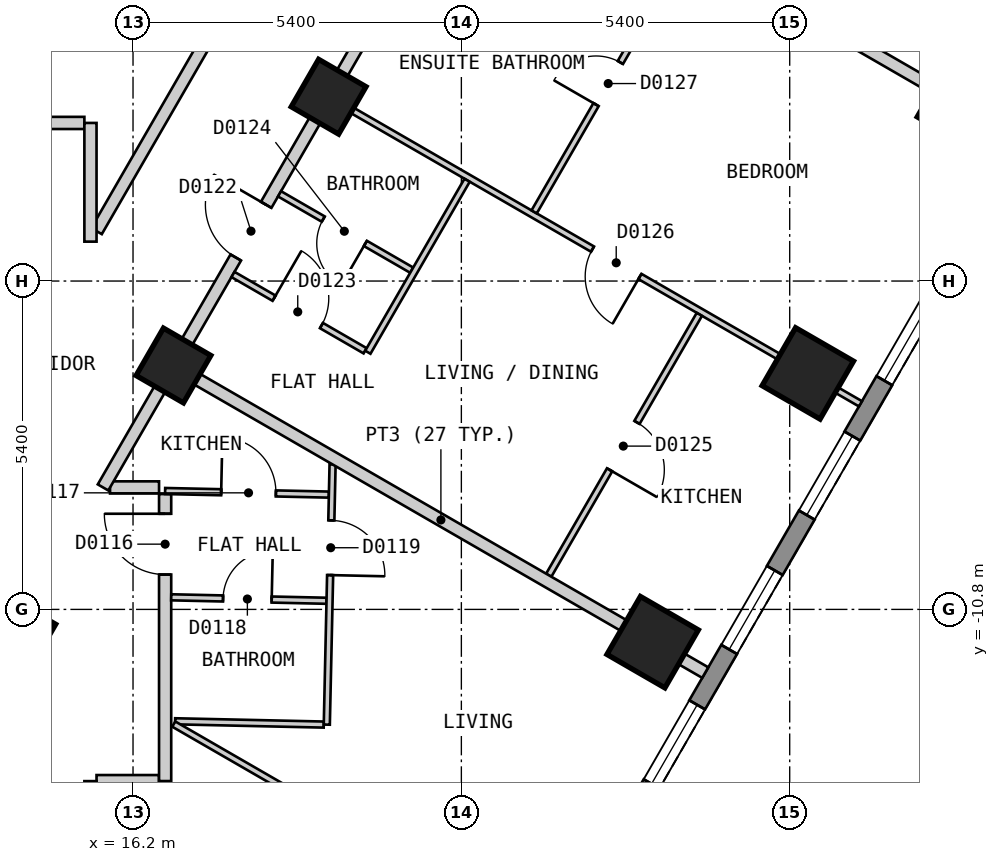
"""IFC4 building model, lengths in metres.
Left out: names, types, materials, properties, quantities, classifications, styles, units other than length and angle.
Written with IfcOpenShell. Run it as: python <this file> out.ifc"""

import sys

from ifc_helpers import new_model, si_unit, direction, frame, frame_2d, origin, origin_2d, place, context, subcontext, project, spatial, polyline, rectangle, outline, extrude, element, fill, save


model = new_model("IFC4")
c1 = context("Model", 3, precision=1e-05, world=origin(), true_north=direction((0.0, 1.0)))
c2 = subcontext(c1, "Body", "Model", "MODEL_VIEW")
j1 = project(units=[si_unit("LENGTHUNIT", "METRE"), si_unit("PLANEANGLEUNIT", "RADIAN")], contexts=[c1])
p1 = place(None, origin())
s1 = spatial("IfcSite", under=j1, at=p1, CompositionType="ELEMENT")
p2 = place(p1, origin())
s2 = spatial("IfcBuilding", under=s1, at=p2, CompositionType="ELEMENT")
p3 = place(p2, frame((0.0, 0.0, 29.4)))
s3 = spatial("IfcBuildingStorey", under=s2, at=p3, CompositionType="ELEMENT", Elevation=29.4)
for number, where, z_axis, x_axis in (
    (1, (24.746, -11.339, 0.0), (0.0, 0.0, 1.0), (0.5, 0.866, 0.0)),
    (2, (27.298, -6.919, 0.0), (0.0, 0.0, 1.0), (0.5, 0.866, 0.0)),
    (3, (29.849, -2.499, 0.0), (0.0, 0.0, 1.0), (0.5, 0.866, 0.0)),
):
    element("IfcColumn", number, at=place(p3, frame(where, z_axis=z_axis, x_axis=x_axis)), inside=s3, PredefinedType="COLUMN", context=c2, shape_type="SweptSolid", body=[
        extrude(rectangle(XDim=1.1, YDim=1.1, at=origin_2d()), origin(), (0.0, 0.0, 1.0), 3.0),
    ])
for number, where, z_axis, x_axis in (
    (4, (14.313, -11.209, 0.0), (0.0, 0.0, 1.0), (0.5, 0.866, 0.0)),
    (5, (16.865, -6.789, 0.0), (0.0, 0.0, 1.0), (0.5, 0.866, 0.0)),
    (6, (19.417, -2.369, 0.0), (0.0, 0.0, 1.0), (0.5, 0.866, 0.0)),
):
    element("IfcColumn", number, at=place(p3, frame(where, z_axis=z_axis, x_axis=x_axis)), inside=s3, PredefinedType="COLUMN", context=c2, shape_type="SweptSolid", body=[
        extrude(rectangle(XDim=0.9, YDim=0.9, at=origin_2d()), origin(), (0.0, 0.0, 1.0), 3.0),
    ])
p4 = place(p3, frame((17.71, -25.825, 0.0), z_axis=(0.0, 0.0, 1.0), x_axis=(0.500001938803, 0.866024284413, 0.0)))
e7 = element("IfcWall", 7, at=p4, inside=s3, PredefinedType="SOLIDWALL", context=c2, shape_type="SweptSolid", body=[
    extrude(outline(polyline([(0.0, -0.15), (27.02, -0.15), (26.94, 0.15), (0.08, 0.15), (0.0, -0.15)])), origin(), (0.0, 0.0, 1.0), 2.7),
])
p5 = place(p4, frame((1.277, 0.0, 0.15)))
e8 = element("IfcOpeningElement", 8, at=p5, cuts=e7, PredefinedType="OPENING", context=c2, shape_type="SweptSolid", body=[
    extrude(rectangle(XDim=1.5, YDim=2.1, at=frame_2d((0.75, 1.05))), frame((0.0, 0.16, 0.0), z_axis=(0.0, -1.0, 0.0), x_axis=(1.0, 0.0, 0.0)), (0.0, 0.0, 1.0), 0.32),
])
p6 = place(p4, frame((3.829, 0.0, 0.15)))
e9 = element("IfcOpeningElement", 9, at=p6, cuts=e7, PredefinedType="OPENING", context=c2, shape_type="SweptSolid", body=[
    extrude(rectangle(XDim=1.5, YDim=2.1, at=frame_2d((0.75, 1.05))), frame((0.0, 0.16, 0.0), z_axis=(0.0, -1.0, 0.0), x_axis=(1.0, 0.0, 0.0)), (0.0, 0.0, 1.0), 0.32),
])
p7 = place(p4, frame((6.382, 0.0, 0.15)))
e10 = element("IfcOpeningElement", 10, at=p7, cuts=e7, PredefinedType="OPENING", context=c2, shape_type="SweptSolid", body=[
    extrude(rectangle(XDim=1.5, YDim=2.1, at=frame_2d((0.75, 1.05))), frame((0.0, 0.16, 0.0), z_axis=(0.0, -1.0, 0.0), x_axis=(1.0, 0.0, 0.0)), (0.0, 0.0, 1.0), 0.32),
])
p8 = place(p4, frame((8.933, 0.0, 0.15)))
e11 = element("IfcOpeningElement", 11, at=p8, cuts=e7, PredefinedType="OPENING", context=c2, shape_type="SweptSolid", body=[
    extrude(rectangle(XDim=1.5, YDim=2.1, at=frame_2d((0.75, 1.05))), frame((0.0, 0.16, 0.0), z_axis=(0.0, -1.0, 0.0), x_axis=(1.0, 0.0, 0.0)), (0.0, 0.0, 1.0), 0.32),
])
p9 = place(p4, frame((11.485, 0.0, 0.15)))
e12 = element("IfcOpeningElement", 12, at=p9, cuts=e7, PredefinedType="OPENING", context=c2, shape_type="SweptSolid", body=[
    extrude(rectangle(XDim=1.5, YDim=2.1, at=frame_2d((0.75, 1.05))), frame((0.0, 0.16, 0.0), z_axis=(0.0, -1.0, 0.0), x_axis=(1.0, 0.0, 0.0)), (0.0, 0.0, 1.0), 0.32),
])
p10 = place(p4, frame((14.037, 0.0, 0.15)))
e13 = element("IfcOpeningElement", 13, at=p10, cuts=e7, PredefinedType="OPENING", context=c2, shape_type="SweptSolid", body=[
    extrude(rectangle(XDim=1.5, YDim=2.1, at=frame_2d((0.75, 1.05))), frame((0.0, 0.16, 0.0), z_axis=(0.0, -1.0, 0.0), x_axis=(1.0, 0.0, 0.0)), (0.0, 0.0, 1.0), 0.32),
])
p11 = place(p4, frame((16.589, 0.0, 0.15)))
e14 = element("IfcOpeningElement", 14, at=p11, cuts=e7, PredefinedType="OPENING", context=c2, shape_type="SweptSolid", body=[
    extrude(rectangle(XDim=1.5, YDim=2.1, at=frame_2d((0.75, 1.05))), frame((0.0, 0.16, 0.0), z_axis=(0.0, -1.0, 0.0), x_axis=(1.0, 0.0, 0.0)), (0.0, 0.0, 1.0), 0.32),
])
p12 = place(p4, frame((19.141, 0.0, 0.15)))
e15 = element("IfcOpeningElement", 15, at=p12, cuts=e7, PredefinedType="OPENING", context=c2, shape_type="SweptSolid", body=[
    extrude(rectangle(XDim=1.5, YDim=2.1, at=frame_2d((0.75, 1.05))), frame((0.0, 0.16, 0.0), z_axis=(0.0, -1.0, 0.0), x_axis=(1.0, 0.0, 0.0)), (0.0, 0.0, 1.0), 0.32),
])
p13 = place(p4, frame((21.693, 0.0, 0.15)))
e16 = element("IfcOpeningElement", 16, at=p13, cuts=e7, PredefinedType="OPENING", context=c2, shape_type="SweptSolid", body=[
    extrude(rectangle(XDim=1.5, YDim=2.1, at=frame_2d((0.75, 1.05))), frame((0.0, 0.16, 0.0), z_axis=(0.0, -1.0, 0.0), x_axis=(1.0, 0.0, 0.0)), (0.0, 0.0, 1.0), 0.32),
])
p14 = place(p4, frame((24.244, 0.0, 0.15)))
e17 = element("IfcOpeningElement", 17, at=p14, cuts=e7, PredefinedType="OPENING", context=c2, shape_type="SweptSolid", body=[
    extrude(rectangle(XDim=1.5, YDim=2.1, at=frame_2d((0.75, 1.05))), frame((0.0, 0.16, 0.0), z_axis=(0.0, -1.0, 0.0), x_axis=(1.0, 0.0, 0.0)), (0.0, 0.0, 1.0), 0.32),
])
p15 = place(p3, frame((15.822, -8.794, 0.0), z_axis=(0.0, 0.0, 1.0), x_axis=(1.0, 0.0, 0.0)))
e18 = element("IfcWall", 18, at=p15, inside=s3, PredefinedType="PARTITIONING", context=c2, shape_type="SweptSolid", body=[
    extrude(rectangle(XDim=0.806, YDim=0.2, at=frame_2d((0.403, 0.0))), origin(), (0.0, 0.0, 1.0), 2.7),
])
p16 = place(p3, frame((15.6, -13.624, 0.0), z_axis=(0.0, 0.0, 1.0), x_axis=(1.0, 0.0, 0.0)))
e19 = element("IfcWall", 19, at=p16, inside=s3, PredefinedType="PARTITIONING", context=c2, shape_type="SweptSolid", body=[
    extrude(rectangle(XDim=1.027, YDim=0.2, at=frame_2d((0.513, 0.0))), origin(), (0.0, 0.0, 1.0), 2.7),
])
p17 = place(p3, frame((7.028, -2.8, 0.0), z_axis=(0.0, 0.0, 1.0), x_axis=(1.0, 0.0, 0.0)))
e20 = element("IfcWall", 20, at=p17, inside=s3, PredefinedType="PARTITIONING", context=c2, shape_type="SweptSolid", body=[
    extrude(rectangle(XDim=8.372, YDim=0.2, at=frame_2d((4.186, 0.0))), origin(), (0.0, 0.0, 1.0), 2.7),
])
p18 = place(p3, frame((15.6, -4.579, 0.0), z_axis=(0.0, 0.0, 1.0), x_axis=(0.499927597274, 0.866067201483, 0.0)))
e21 = element("IfcWall", 21, at=p18, inside=s3, PredefinedType="PARTITIONING", context=c2, shape_type="SweptSolid", body=[
    extrude(rectangle(XDim=5.288, YDim=0.2, at=frame_2d((2.644, 0.0))), origin(), (0.0, 0.0, 1.0), 2.7),
])
p19 = place(p3, frame((15.707, -8.794, 0.0), z_axis=(0.0, 0.0, 1.0), x_axis=(0.500040469623, 0.866002037376, 0.0)))
e22 = element("IfcWall", 22, at=p19, inside=s3, PredefinedType="PARTITIONING", context=c2, shape_type="SweptSolid", body=[
    extrude(rectangle(XDim=2.281, YDim=0.2, at=frame_2d((1.141, 0.0))), origin(), (0.0, 0.0, 1.0), 2.7),
])
p20 = place(p3, frame((16.914, -6.703, 0.0), z_axis=(0.0, 0.0, 1.0), x_axis=(0.50003007663, 0.866008038338, 0.0)))
e23 = element("IfcWall", 23, at=p20, inside=s3, PredefinedType="PARTITIONING", context=c2, shape_type="SweptSolid", body=[
    extrude(rectangle(XDim=7.625, YDim=0.2, at=frame_2d((3.813, 0.0))), origin(), (0.0, 0.0, 1.0), 2.7),
])
p21 = place(p20, frame((1.952, 0.0, 0.0)))
e24 = element("IfcOpeningElement", 24, at=p21, cuts=e23, PredefinedType="OPENING", context=c2, shape_type="SweptSolid", body=[
    extrude(rectangle(XDim=1.0, YDim=2.1, at=frame_2d((0.5, 1.05))), frame((0.0, 0.11, 0.0), z_axis=(0.0, -1.0, 0.0), x_axis=(1.0, 0.0, 0.0)), (0.0, 0.0, 1.0), 0.22),
])
p22 = place(p3, frame((15.5, -21.199, 0.0), z_axis=(0.0, 0.0, 1.0), x_axis=(0.0, 1.0, 0.0)))
e25 = element("IfcWall", 25, at=p22, inside=s3, PredefinedType="PARTITIONING", context=c2, shape_type="SweptSolid", body=[
    extrude(rectangle(XDim=7.575, YDim=0.2, at=frame_2d((3.788, 0.0))), origin(), (0.0, 0.0, 1.0), 2.7),
])
p23 = place(p22, frame((1.288, 0.0, 0.0)))
e26 = element("IfcOpeningElement", 26, at=p23, cuts=e25, PredefinedType="OPENING", context=c2, shape_type="SweptSolid", body=[
    extrude(rectangle(XDim=0.8, YDim=2.1, at=frame_2d((0.4, 1.05))), frame((0.0, 0.11, 0.0), z_axis=(0.0, -1.0, 0.0), x_axis=(1.0, 0.0, 0.0)), (0.0, 0.0, 1.0), 0.22),
])
p24 = place(p3, frame((15.5, -4.752, 0.0), z_axis=(0.0, 0.0, 1.0), x_axis=(0.0, 1.0, 0.0)))
e27 = element("IfcWall", 27, at=p24, inside=s3, PredefinedType="PARTITIONING", context=c2, shape_type="SweptSolid", body=[
    extrude(rectangle(XDim=1.952, YDim=0.2, at=frame_2d((0.976, 0.0))), origin(), (0.0, 0.0, 1.0), 2.7),
])
p25 = place(p3, frame((16.728, -13.623, 0.0), z_axis=(0.0, 0.0, 1.0), x_axis=(0.0, 1.0, 0.0)))
e28 = element("IfcWall", 28, at=p25, inside=s3, PredefinedType="PARTITIONING", context=c2, shape_type="SweptSolid", body=[
    extrude(rectangle(XDim=4.72, YDim=0.2, at=frame_2d((2.36, 0.0))), origin(), (0.0, 0.0, 1.0), 2.7),
])
p26 = place(p25, frame((3.396, 0.0, 0.0)))
e29 = element("IfcOpeningElement", 29, at=p26, cuts=e28, PredefinedType="OPENING", context=c2, shape_type="SweptSolid", body=[
    extrude(rectangle(XDim=1.0, YDim=2.1, at=frame_2d((0.5, 1.05))), frame((0.0, 0.11, 0.0), z_axis=(0.0, -1.0, 0.0), x_axis=(1.0, 0.0, 0.0)), (0.0, 0.0, 1.0), 0.22),
])
p27 = place(p3, frame((16.728, -8.853, 0.0), z_axis=(0.0, 0.0, 1.0), x_axis=(0.999759401479, -0.02193488442, 0.0)))
e30 = element("IfcWall", 30, at=p27, inside=s3, PredefinedType="PARTITIONING", context=c2, shape_type="SweptSolid", body=[
    extrude(rectangle(XDim=2.694, YDim=0.1, at=frame_2d((1.347, 0.0))), origin(), (0.0, 0.0, 1.0), 2.7),
])
p28 = place(p27, frame((0.922, 0.0, 0.0)))
e31 = element("IfcOpeningElement", 31, at=p28, cuts=e30, PredefinedType="OPENING", context=c2, shape_type="SweptSolid", body=[
    extrude(rectangle(XDim=0.9, YDim=2.1, at=frame_2d((0.45, 1.05))), frame((0.0, 0.06, 0.0), z_axis=(0.0, -1.0, 0.0), x_axis=(1.0, 0.0, 0.0)), (0.0, 0.0, 1.0), 0.12),
])
p29 = place(p3, frame((16.828, -10.601, 0.0), z_axis=(0.0, 0.0, 1.0), x_axis=(0.999752091799, -0.022265555094, 0.0)))
e32 = element("IfcWall", 32, at=p29, inside=s3, PredefinedType="PARTITIONING", context=c2, shape_type="SweptSolid", body=[
    extrude(rectangle(XDim=2.555, YDim=0.1, at=frame_2d((1.277, 0.0))), origin(), (0.0, 0.0, 1.0), 2.7),
])
p30 = place(p29, frame((0.853, 0.0, 0.0)))
e33 = element("IfcOpeningElement", 33, at=p30, cuts=e32, PredefinedType="OPENING", context=c2, shape_type="SweptSolid", body=[
    extrude(rectangle(XDim=0.8, YDim=2.1, at=frame_2d((0.4, 1.05))), frame((0.0, 0.06, 0.0), z_axis=(0.0, -1.0, 0.0), x_axis=(1.0, 0.0, 0.0)), (0.0, 0.0, 1.0), 0.12),
])
p31 = place(p3, frame((16.892, -12.64, 0.0), z_axis=(0.0, 0.0, 1.0), x_axis=(0.999754359069, -0.022163517846, 0.0)))
e34 = element("IfcWall", 34, at=p31, inside=s3, PredefinedType="PARTITIONING", context=c2, shape_type="SweptSolid", body=[
    extrude(rectangle(XDim=2.445, YDim=0.1, at=frame_2d((1.223, 0.0))), origin(), (0.0, 0.0, 1.0), 2.7),
])
p32 = place(p3, frame((16.87, -12.686, 0.0), z_axis=(0.0, 0.0, 1.0), x_axis=(0.866071826058, -0.499919585642, 0.0)))
e35 = element("IfcWall", 35, at=p32, inside=s3, PredefinedType="PARTITIONING", context=c2, shape_type="SweptSolid", body=[
    extrude(rectangle(XDim=7.147, YDim=0.1, at=frame_2d((3.574, 0.0))), origin(), (0.0, 0.0, 1.0), 2.7),
])
p33 = place(p32, frame((4.558, 0.0, 0.0)))
e36 = element("IfcOpeningElement", 36, at=p33, cuts=e35, PredefinedType="OPENING", context=c2, shape_type="SweptSolid", body=[
    extrude(rectangle(XDim=0.9, YDim=2.1, at=frame_2d((0.45, 1.05))), frame((0.0, 0.06, 0.0), z_axis=(0.0, -1.0, 0.0), x_axis=(1.0, 0.0, 0.0)), (0.0, 0.0, 1.0), 0.12),
])
p34 = place(p3, frame((17.844, -5.292, 0.0), z_axis=(0.0, 0.0, 1.0), x_axis=(0.865940918122, -0.500146304917, 0.0)))
e37 = element("IfcWall", 37, at=p34, inside=s3, PredefinedType="PARTITIONING", context=c2, shape_type="SweptSolid", body=[
    extrude(rectangle(XDim=2.51, YDim=0.1, at=frame_2d((1.255, 0.0))), origin(), (0.0, 0.0, 1.0), 2.7),
])
p35 = place(p34, frame((0.78, 0.0, 0.0)))
e38 = element("IfcOpeningElement", 38, at=p35, cuts=e37, PredefinedType="OPENING", context=c2, shape_type="SweptSolid", body=[
    extrude(rectangle(XDim=0.9, YDim=2.1, at=frame_2d((0.45, 1.05))), frame((0.0, 0.06, 0.0), z_axis=(0.0, -1.0, 0.0), x_axis=(1.0, 0.0, 0.0)), (0.0, 0.0, 1.0), 0.12),
])
p36 = place(p3, frame((18.61, -3.966, 0.0), z_axis=(0.0, 0.0, 1.0), x_axis=(0.865958718457, -0.500115484592, 0.0)))
e39 = element("IfcWall", 39, at=p36, inside=s3, PredefinedType="PARTITIONING", context=c2, shape_type="SweptSolid", body=[
    extrude(rectangle(XDim=2.509, YDim=0.1, at=frame_2d((1.255, 0.0))), origin(), (0.0, 0.0, 1.0), 2.7),
])
p37 = place(p36, frame((0.83, 0.0, 0.0)))
e40 = element("IfcOpeningElement", 40, at=p37, cuts=e39, PredefinedType="OPENING", context=c2, shape_type="SweptSolid", body=[
    extrude(rectangle(XDim=0.8, YDim=2.1, at=frame_2d((0.4, 1.05))), frame((0.0, 0.06, 0.0), z_axis=(0.0, -1.0, 0.0), x_axis=(1.0, 0.0, 0.0)), (0.0, 0.0, 1.0), 0.12),
])
p38 = place(p3, frame((19.503, -2.419, 0.0), z_axis=(0.0, 0.0, 1.0), x_axis=(0.866047370643, -0.499961950354, 0.0)))
e41 = element("IfcWall", 41, at=p38, inside=s3, PredefinedType="PARTITIONING", context=c2, shape_type="SweptSolid", body=[
    extrude(rectangle(XDim=10.001, YDim=0.1, at=frame_2d((5.0, 0.0))), origin(), (0.0, 0.0, 1.0), 2.7),
])
p39 = place(p38, frame((4.912, 0.0, 0.0)))
e42 = element("IfcOpeningElement", 42, at=p39, cuts=e41, PredefinedType="OPENING", context=c2, shape_type="SweptSolid", body=[
    extrude(rectangle(XDim=0.9, YDim=2.1, at=frame_2d((0.45, 1.05))), frame((0.0, 0.06, 0.0), z_axis=(0.0, -1.0, 0.0), x_axis=(1.0, 0.0, 0.0)), (0.0, 0.0, 1.0), 0.12),
])
p40 = place(p3, frame((20.062, -6.571, 0.0), z_axis=(0.0, 0.0, 1.0), x_axis=(0.49983032932, 0.866123341039, 0.0)))
e43 = element("IfcWall", 43, at=p40, inside=s3, PredefinedType="PARTITIONING", context=c2, shape_type="SweptSolid", body=[
    extrude(rectangle(XDim=3.265, YDim=0.1, at=frame_2d((1.633, 0.0))), origin(), (0.0, 0.0, 1.0), 2.7),
])
p41 = place(p3, frame((22.797, -4.263, 0.0), z_axis=(0.0, 0.0, 1.0), x_axis=(0.499820637322, 0.866128934112, 0.0)))
e44 = element("IfcWall", 44, at=p41, inside=s3, PredefinedType="PARTITIONING", context=c2, shape_type="SweptSolid", body=[
    extrude(rectangle(XDim=4.807, YDim=0.1, at=frame_2d((2.404, 0.0))), origin(), (0.0, 0.0, 1.0), 2.7),
])
p42 = place(p41, frame((2.037, 0.0, 0.0)))
e45 = element("IfcOpeningElement", 45, at=p42, cuts=e44, PredefinedType="OPENING", context=c2, shape_type="SweptSolid", body=[
    extrude(rectangle(XDim=0.8, YDim=2.1, at=frame_2d((0.4, 1.05))), frame((0.0, 0.06, 0.0), z_axis=(0.0, -1.0, 0.0), x_axis=(1.0, 0.0, 0.0)), (0.0, 0.0, 1.0), 0.12),
])
p43 = place(p3, frame((23.037, -10.238, 0.0), z_axis=(0.0, 0.0, 1.0), x_axis=(0.49999264683, 0.866029649098, 0.0)))
e46 = element("IfcWall", 46, at=p43, inside=s3, PredefinedType="PARTITIONING", context=c2, shape_type="SweptSolid", body=[
    extrude(rectangle(XDim=4.954, YDim=0.1, at=frame_2d((2.477, 0.0))), origin(), (0.0, 0.0, 1.0), 2.7),
])
p44 = place(p43, frame((2.002, 0.0, 0.0)))
e47 = element("IfcOpeningElement", 47, at=p44, cuts=e46, PredefinedType="OPENING", context=c2, shape_type="SweptSolid", body=[
    extrude(rectangle(XDim=0.9, YDim=2.1, at=frame_2d((0.45, 1.05))), frame((0.0, 0.06, 0.0), z_axis=(0.0, -1.0, 0.0), x_axis=(1.0, 0.0, 0.0)), (0.0, 0.0, 1.0), 0.12),
])
p45 = place(p3, frame((19.387, -12.695, 0.0), z_axis=(0.0, 0.0, 1.0), x_axis=(0.022188864436, 0.99975379684, 0.0)))
e48 = element("IfcWall", 48, at=p45, inside=s3, PredefinedType="PARTITIONING", context=c2, shape_type="SweptSolid", body=[
    extrude(rectangle(XDim=4.28, YDim=0.1, at=frame_2d((2.14, 0.0))), origin(), (0.0, 0.0, 1.0), 2.7),
])
p46 = place(p45, frame((2.46, 0.0, 0.0)))
e49 = element("IfcOpeningElement", 49, at=p46, cuts=e48, PredefinedType="OPENING", context=c2, shape_type="SweptSolid", body=[
    extrude(rectangle(XDim=0.9, YDim=2.1, at=frame_2d((0.45, 1.05))), frame((0.0, 0.06, 0.0), z_axis=(0.0, -1.0, 0.0), x_axis=(1.0, 0.0, 0.0)), (0.0, 0.0, 1.0), 0.12),
])
p47 = place(p3, frame((25.693, -0.099, 0.0), z_axis=(0.0, 0.0, 1.0), x_axis=(0.866032775405, -0.499987231761, 0.0)))
e50 = element("IfcWall", 50, at=p47, inside=s3, PredefinedType="PARTITIONING", context=c2, shape_type="SweptSolid", body=[
    extrude(rectangle(XDim=5.8, YDim=0.2, at=frame_2d((2.9, 0.0))), origin(), (0.0, 0.0, 1.0), 2.7),
])
p48 = place(p3, frame((16.916, -6.819, 0.0), z_axis=(0.0, 0.0, 1.0), x_axis=(0.866028876723, -0.499993984646, 0.0)))
e51 = element("IfcWall", 51, at=p48, inside=s3, PredefinedType="PARTITIONING", context=c2, shape_type="SweptSolid", body=[
    extrude(rectangle(XDim=10.04, YDim=0.2, at=frame_2d((5.02, 0.0))), origin(), (0.0, 0.0, 1.0), 2.7),
])
p49 = place(p10, origin())
e52 = element("IfcWindow", 52, at=p49, inside=s3, PartitioningType="SINGLE_PANEL", PredefinedType="WINDOW", context=c2, shape_type="SweptSolid", body=[
    extrude(rectangle(XDim=1.5, YDim=2.1, at=frame_2d((0.75, 1.05))), frame((0.0, 0.03, 0.0), z_axis=(0.0, -1.0, 0.0), x_axis=(1.0, 0.0, 0.0)), (0.0, 0.0, 1.0), 0.06),
])
fill(e13, e52)
p50 = place(p11, origin())
e53 = element("IfcWindow", 53, at=p50, inside=s3, PartitioningType="SINGLE_PANEL", PredefinedType="WINDOW", context=c2, shape_type="SweptSolid", body=[
    extrude(rectangle(XDim=1.5, YDim=2.1, at=frame_2d((0.75, 1.05))), frame((0.0, 0.03, 0.0), z_axis=(0.0, -1.0, 0.0), x_axis=(1.0, 0.0, 0.0)), (0.0, 0.0, 1.0), 0.06),
])
fill(e14, e53)
p51 = place(p12, origin())
e54 = element("IfcWindow", 54, at=p51, inside=s3, PartitioningType="SINGLE_PANEL", PredefinedType="WINDOW", context=c2, shape_type="SweptSolid", body=[
    extrude(rectangle(XDim=1.5, YDim=2.1, at=frame_2d((0.75, 1.05))), frame((0.0, 0.03, 0.0), z_axis=(0.0, -1.0, 0.0), x_axis=(1.0, 0.0, 0.0)), (0.0, 0.0, 1.0), 0.06),
])
fill(e15, e54)
p52 = place(p13, origin())
e55 = element("IfcWindow", 55, at=p52, inside=s3, PartitioningType="SINGLE_PANEL", PredefinedType="WINDOW", context=c2, shape_type="SweptSolid", body=[
    extrude(rectangle(XDim=1.5, YDim=2.1, at=frame_2d((0.75, 1.05))), frame((0.0, 0.03, 0.0), z_axis=(0.0, -1.0, 0.0), x_axis=(1.0, 0.0, 0.0)), (0.0, 0.0, 1.0), 0.06),
])
fill(e16, e55)
p53 = place(p26, origin())
e56 = element("IfcDoor", 56, at=p53, inside=s3, OperationType="SINGLE_SWING_RIGHT", PredefinedType="DOOR", context=c2, shape_type="SweptSolid", body=[
    extrude(rectangle(XDim=1.0, YDim=2.1, at=frame_2d((0.5, 1.05))), frame((0.0, 0.025, 0.0), z_axis=(0.0, -1.0, 0.0), x_axis=(1.0, 0.0, 0.0)), (0.0, 0.0, 1.0), 0.05),
])
fill(e29, e56)
p54 = place(p28, origin())
e57 = element("IfcDoor", 57, at=p54, inside=s3, OperationType="SINGLE_SWING_LEFT", PredefinedType="DOOR", context=c2, shape_type="SweptSolid", body=[
    extrude(rectangle(XDim=0.9, YDim=2.1, at=frame_2d((0.45, 1.05))), frame((0.0, 0.025, 0.0), z_axis=(0.0, -1.0, 0.0), x_axis=(1.0, 0.0, 0.0)), (0.0, 0.0, 1.0), 0.05),
])
fill(e31, e57)
p55 = place(p30, origin())
e58 = element("IfcDoor", 58, at=p55, inside=s3, OperationType="SINGLE_SWING_RIGHT", PredefinedType="DOOR", context=c2, shape_type="SweptSolid", body=[
    extrude(rectangle(XDim=0.8, YDim=2.1, at=frame_2d((0.4, 1.05))), frame((0.0, 0.025, 0.0), z_axis=(0.0, -1.0, 0.0), x_axis=(1.0, 0.0, 0.0)), (0.0, 0.0, 1.0), 0.05),
])
fill(e33, e58)
p56 = place(p46, origin())
e59 = element("IfcDoor", 59, at=p56, inside=s3, OperationType="SINGLE_SWING_LEFT", PredefinedType="DOOR", context=c2, shape_type="SweptSolid", body=[
    extrude(rectangle(XDim=0.9, YDim=2.1, at=frame_2d((0.45, 1.05))), frame((0.0, 0.025, 0.0), z_axis=(0.0, -1.0, 0.0), x_axis=(1.0, 0.0, 0.0)), (0.0, 0.0, 1.0), 0.05),
])
fill(e49, e59)
p57 = place(p21, origin())
e60 = element("IfcDoor", 60, at=p57, inside=s3, OperationType="SINGLE_SWING_RIGHT", PredefinedType="DOOR", context=c2, shape_type="SweptSolid", body=[
    extrude(rectangle(XDim=1.0, YDim=2.1, at=frame_2d((0.5, 1.05))), frame((0.0, 0.025, 0.0), z_axis=(0.0, -1.0, 0.0), x_axis=(1.0, 0.0, 0.0)), (0.0, 0.0, 1.0), 0.05),
])
fill(e24, e60)
p58 = place(p35, origin())
e61 = element("IfcDoor", 61, at=p58, inside=s3, OperationType="SINGLE_SWING_LEFT", PredefinedType="DOOR", context=c2, shape_type="SweptSolid", body=[
    extrude(rectangle(XDim=0.9, YDim=2.1, at=frame_2d((0.45, 1.05))), frame((0.0, 0.025, 0.0), z_axis=(0.0, -1.0, 0.0), x_axis=(1.0, 0.0, 0.0)), (0.0, 0.0, 1.0), 0.05),
])
fill(e38, e61)
p59 = place(p37, origin())
e62 = element("IfcDoor", 62, at=p59, inside=s3, OperationType="SINGLE_SWING_RIGHT", PredefinedType="DOOR", context=c2, shape_type="SweptSolid", body=[
    extrude(rectangle(XDim=0.8, YDim=2.1, at=frame_2d((0.4, 1.05))), frame((0.0, 0.025, 0.0), z_axis=(0.0, -1.0, 0.0), x_axis=(1.0, 0.0, 0.0)), (0.0, 0.0, 1.0), 0.05),
])
fill(e40, e62)
p60 = place(p44, origin())
e63 = element("IfcDoor", 63, at=p60, inside=s3, OperationType="SINGLE_SWING_LEFT", PredefinedType="DOOR", context=c2, shape_type="SweptSolid", body=[
    extrude(rectangle(XDim=0.9, YDim=2.1, at=frame_2d((0.45, 1.05))), frame((0.0, 0.025, 0.0), z_axis=(0.0, -1.0, 0.0), x_axis=(1.0, 0.0, 0.0)), (0.0, 0.0, 1.0), 0.05),
])
fill(e47, e63)
p61 = place(p39, origin())
e64 = element("IfcDoor", 64, at=p61, inside=s3, OperationType="SINGLE_SWING_RIGHT", PredefinedType="DOOR", context=c2, shape_type="SweptSolid", body=[
    extrude(rectangle(XDim=0.9, YDim=2.1, at=frame_2d((0.45, 1.05))), frame((0.0, 0.025, 0.0), z_axis=(0.0, -1.0, 0.0), x_axis=(1.0, 0.0, 0.0)), (0.0, 0.0, 1.0), 0.05),
])
fill(e42, e64)
p62 = place(p42, origin())
e65 = element("IfcDoor", 65, at=p62, inside=s3, OperationType="SINGLE_SWING_LEFT", PredefinedType="DOOR", context=c2, shape_type="SweptSolid", body=[
    extrude(rectangle(XDim=0.8, YDim=2.1, at=frame_2d((0.4, 1.05))), frame((0.0, 0.025, 0.0), z_axis=(0.0, -1.0, 0.0), x_axis=(1.0, 0.0, 0.0)), (0.0, 0.0, 1.0), 0.05),
])
fill(e45, e65)
save(model, sys.argv[1])
